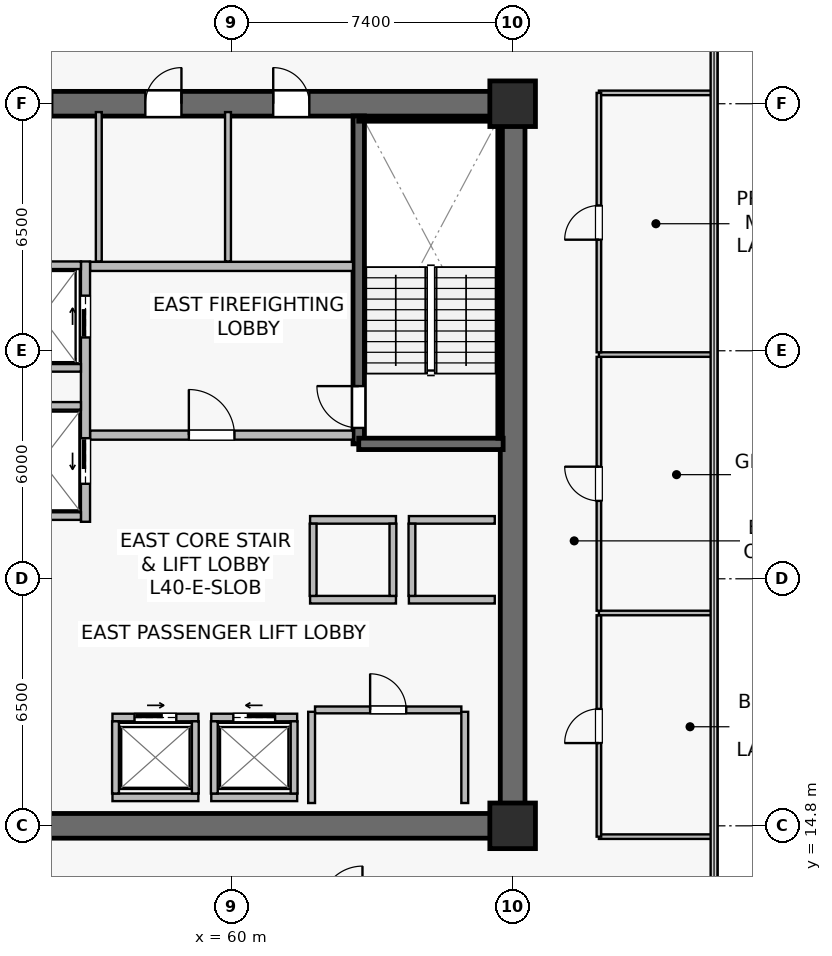
"""IFC4 building model, lengths in metres.
Left out: names, types, materials, properties, quantities, classifications, styles, units other than length and angle.
Written with IfcOpenShell. Run it as: python <this file> out.ifc"""

import sys

from ifc_helpers import new_model, si_unit, direction, frame, frame_2d, origin, origin_2d, place, context, subcontext, project, spatial, rectangle, extrude, source, transform, mapped, element, fill, save


model = new_model("IFC4")
c1 = context("Model", 3, precision=1e-05, world=origin(), true_north=direction((0.0, 1.0)))
c2 = subcontext(c1, "Body", "Model", "MODEL_VIEW")
j1 = project(units=[si_unit("LENGTHUNIT", "METRE"), si_unit("PLANEANGLEUNIT", "RADIAN")], contexts=[c1])
p1 = place(None, origin())
s1 = spatial("IfcSite", under=j1, at=p1, CompositionType="ELEMENT")
p2 = place(p1, origin())
s2 = spatial("IfcBuilding", under=s1, at=p2, CompositionType="ELEMENT")
p3 = place(p2, frame((0.0, 0.0, 166.6)))
s3 = spatial("IfcBuildingStorey", under=s2, at=p3, CompositionType="ELEMENT", Elevation=166.6)
p4 = place(p3, frame((52.275, 14.8, 0.0), z_axis=(0.0, 0.0, 1.0), x_axis=(1.0, 0.0, 0.0)))
e1 = element("IfcWall", 1, at=p4, inside=s3, PredefinedType="SHEAR", context=c2, shape_type="SweptSolid", body=[
    extrude(rectangle(XDim=15.45, YDim=0.65, at=frame_2d((7.725, 0.0))), origin(), (0.0, 0.0, 1.0), 3.79),
])
p5 = place(p3, frame((52.275, 33.8, 0.0), z_axis=(0.0, 0.0, 1.0), x_axis=(1.0, 0.0, 0.0)))
e2 = element("IfcWall", 2, at=p5, inside=s3, PredefinedType="SHEAR", context=c2, shape_type="SweptSolid", body=[
    extrude(rectangle(XDim=15.45, YDim=0.65, at=frame_2d((7.725, 0.0))), origin(), (0.0, 0.0, 1.0), 3.79),
])
p6 = place(p5, frame((8.825, 0.0, 0.0)))
e3 = element("IfcOpeningElement", 3, at=p6, cuts=e2, PredefinedType="OPENING", context=c2, shape_type="SweptSolid", body=[
    extrude(rectangle(XDim=0.95, YDim=2.15, at=frame_2d((0.475, 1.075))), frame((0.0, 0.335, 0.0), z_axis=(0.0, -1.0, 0.0), x_axis=(1.0, 0.0, 0.0)), (0.0, 0.0, 1.0), 0.67),
])
p7 = place(p5, frame((5.46, 0.0, 0.0)))
e4 = element("IfcOpeningElement", 4, at=p7, cuts=e2, PredefinedType="OPENING", context=c2, shape_type="SweptSolid", body=[
    extrude(rectangle(XDim=0.95, YDim=2.15, at=frame_2d((0.475, 1.075))), frame((0.0, 0.335, 0.0), z_axis=(0.0, -1.0, 0.0), x_axis=(1.0, 0.0, 0.0)), (0.0, 0.0, 1.0), 0.67),
])
p8 = place(p5, frame((2.06, 0.0, 0.0)))
e5 = element("IfcOpeningElement", 5, at=p8, cuts=e2, PredefinedType="OPENING", context=c2, shape_type="SweptSolid", body=[
    extrude(rectangle(XDim=0.95, YDim=2.15, at=frame_2d((0.475, 1.075))), frame((0.0, 0.335, 0.0), z_axis=(0.0, -1.0, 0.0), x_axis=(1.0, 0.0, 0.0)), (0.0, 0.0, 1.0), 0.67),
])
p9 = place(p3, frame((67.4, 15.125, 0.0), z_axis=(0.0, 0.0, 1.0), x_axis=(0.0, 1.0, 0.0)))
e6 = element("IfcWall", 6, at=p9, inside=s3, PredefinedType="SHEAR", context=c2, shape_type="SweptSolid", body=[
    extrude(rectangle(XDim=18.35, YDim=0.65, at=frame_2d((9.175, 0.0))), origin(), (0.0, 0.0, 1.0), 3.79),
])
p10 = place(p3, frame((63.35, 24.85, 0.0), z_axis=(0.0, 0.0, 1.0), x_axis=(0.0, 1.0, 0.0)))
e7 = element("IfcWall", 7, at=p10, inside=s3, PredefinedType="SHEAR", context=c2, shape_type="SweptSolid", body=[
    extrude(rectangle(XDim=8.63, YDim=0.3, at=frame_2d((4.315, 0.0))), origin(), (0.0, 0.0, 1.0), 3.79),
])
p11 = place(p10, frame((0.42, 0.0, 0.0)))
e8 = element("IfcOpeningElement", 8, at=p11, cuts=e7, PredefinedType="OPENING", context=c2, shape_type="SweptSolid", body=[
    extrude(rectangle(XDim=1.1, YDim=2.15, at=frame_2d((0.55, 1.075))), frame((0.0, 0.16, 0.0), z_axis=(0.0, -1.0, 0.0), x_axis=(1.0, 0.0, 0.0)), (0.0, 0.0, 1.0), 0.32),
])
p12 = place(p3, frame((63.35, 24.85, 0.0), z_axis=(0.0, 0.0, 1.0), x_axis=(1.0, 0.0, 0.0)))
e9 = element("IfcWall", 9, at=p12, inside=s3, PredefinedType="SHEAR", context=c2, shape_type="SweptSolid", body=[
    extrude(rectangle(XDim=3.8, YDim=0.3, at=frame_2d((1.9, 0.0))), origin(), (0.0, 0.0, 1.0), 3.79),
])
p13 = place(p3, frame((63.35, 33.4, 0.0), z_axis=(0.0, 0.0, 1.0), x_axis=(1.0, 0.0, 0.0)))
e10 = element("IfcWall", 10, at=p13, inside=s3, PredefinedType="SOLIDWALL", context=c2, shape_type="SweptSolid", body=[
    extrude(rectangle(XDim=3.72, YDim=0.12, at=frame_2d((1.86, 0.0))), origin(), (0.0, 0.0, 1.0), 3.79),
])
p14 = place(p3, frame((67.07, 25.0, 0.0), z_axis=(0.0, 0.0, 1.0), x_axis=(0.0, 1.0, 0.0)))
e11 = element("IfcWall", 11, at=p14, inside=s3, PredefinedType="SOLIDWALL", context=c2, shape_type="SweptSolid", body=[
    extrude(rectangle(XDim=8.32, YDim=0.12, at=frame_2d((4.16, 0.0))), origin(), (0.0, 0.0, 1.0), 3.79),
])
m1 = source(origin(), c2, "Body", "SweptSolid", [
    extrude(rectangle(XDim=1.2, YDim=1.2, at=origin_2d()), origin(), (0.0, 0.0, 1.0), 4.1),
])
for number, where, z_axis, x_axis in (
    (12, (67.4, 14.8, 0.0), (0.0, 0.0, 1.0), (1.0, 0.0, 0.0)),
    (13, (67.4, 33.8, 0.0), (0.0, 0.0, 1.0), (1.0, 0.0, 0.0)),
):
    element("IfcColumn", number, at=place(p3, frame(where, z_axis=z_axis, x_axis=x_axis)), inside=s3, PredefinedType="COLUMN", context=c2, shape_type="MappedRepresentation", body=[
        mapped(m1, transform((0.0, 0.0, 0.0), scale=1.0)),
    ])
p15 = place(p3, frame((56.28, 25.08, 0.0), z_axis=(0.0, 0.0, 1.0), x_axis=(1.0, 0.0, 0.0)))
e14 = element("IfcWall", 14, at=p15, inside=s3, PredefinedType="SOLIDWALL", context=c2, shape_type="SweptSolid", body=[
    extrude(rectangle(XDim=6.92, YDim=0.24, at=frame_2d((3.46, 0.0))), origin(), (0.0, 0.0, 1.0), 3.187),
])
p16 = place(p15, frame((2.6, 0.0, 0.0)))
e15 = element("IfcOpeningElement", 15, at=p16, cuts=e14, PredefinedType="OPENING", context=c2, shape_type="SweptSolid", body=[
    extrude(rectangle(XDim=1.2, YDim=2.16, at=frame_2d((0.6, 1.08))), frame((0.0, 0.13, 0.0), z_axis=(0.0, -1.0, 0.0), x_axis=(1.0, 0.0, 0.0)), (0.0, 0.0, 1.0), 0.26),
])
p17 = place(p3, frame((56.28, 29.52, 0.0), z_axis=(0.0, 0.0, 1.0), x_axis=(1.0, 0.0, 0.0)))
e16 = element("IfcWall", 16, at=p17, inside=s3, PredefinedType="SOLIDWALL", context=c2, shape_type="SweptSolid", body=[
    extrude(rectangle(XDim=6.92, YDim=0.24, at=frame_2d((3.46, 0.0))), origin(), (0.0, 0.0, 1.0), 3.187),
])
p18 = place(p3, frame((56.16, 22.8, 0.0), z_axis=(0.0, 0.0, 1.0), x_axis=(0.0, 1.0, 0.0)))
e17 = element("IfcWall", 17, at=p18, inside=s3, PredefinedType="SOLIDWALL", context=c2, shape_type="SweptSolid", body=[
    extrude(rectangle(XDim=6.85, YDim=0.24, at=frame_2d((3.425, 0.0))), origin(), (0.0, 0.0, 1.0), 2.925),
])
p19 = place(p18, frame((4.85, 0.0, 0.0)))
e18 = element("IfcOpeningElement", 18, at=p19, cuts=e17, PredefinedType="OPENING", context=c2, shape_type="SweptSolid", body=[
    extrude(rectangle(XDim=1.1, YDim=2.22, at=frame_2d((0.55, 1.11))), frame((0.0, 0.13, 0.0), z_axis=(0.0, -1.0, 0.0), x_axis=(1.0, 0.0, 0.0)), (0.0, 0.0, 1.0), 0.26),
])
p20 = place(p18, frame((1.0, 0.0, 0.0)))
e19 = element("IfcOpeningElement", 19, at=p20, cuts=e17, PredefinedType="OPENING", context=c2, shape_type="SweptSolid", body=[
    extrude(rectangle(XDim=1.2, YDim=2.22, at=frame_2d((0.6, 1.11))), frame((0.0, 0.13, 0.0), z_axis=(0.0, -1.0, 0.0), x_axis=(1.0, 0.0, 0.0)), (0.0, 0.0, 1.0), 0.26),
])
p21 = place(p3, frame((59.47, 17.65, 0.0), z_axis=(0.0, 0.0, 1.0), x_axis=(1.0, 0.0, 0.0)))
e20 = element("IfcWall", 20, at=p21, inside=s3, PredefinedType="SOLIDWALL", context=c2, shape_type="SweptSolid", body=[
    extrude(rectangle(XDim=2.26, YDim=0.2, at=frame_2d((1.13, 0.0))), origin(), (0.0, 0.0, 1.0), 3.187),
])
p22 = place(p21, frame((0.58, 0.0, 0.0)))
e21 = element("IfcOpeningElement", 21, at=p22, cuts=e20, PredefinedType="OPENING", context=c2, shape_type="SweptSolid", body=[
    extrude(rectangle(XDim=1.1, YDim=2.22, at=frame_2d((0.55, 1.11))), frame((0.0, 0.11, 0.0), z_axis=(0.0, -1.0, 0.0), x_axis=(1.0, 0.0, 0.0)), (0.0, 0.0, 1.0), 0.22),
])
p23 = place(p3, frame((59.47, 15.55, 0.0), z_axis=(0.0, 0.0, 1.0), x_axis=(1.0, 0.0, 0.0)))
e22 = element("IfcWall", 22, at=p23, inside=s3, PredefinedType="SOLIDWALL", context=c2, shape_type="SweptSolid", body=[
    extrude(rectangle(XDim=2.26, YDim=0.2, at=frame_2d((1.13, 0.0))), origin(), (0.0, 0.0, 1.0), 3.187),
])
for number, where, z_axis, x_axis in (
    (23, (59.55, 15.65, 0.0), (0.0, 0.0, 1.0), (0.0, 1.0, 0.0)),
    (24, (61.65, 15.65, 0.0), (0.0, 0.0, 1.0), (0.0, 1.0, 0.0)),
):
    element("IfcWall", number, at=place(p3, frame(where, z_axis=z_axis, x_axis=x_axis)), inside=s3, PredefinedType="SOLIDWALL", context=c2, shape_type="SweptSolid", body=[
        extrude(rectangle(XDim=1.9, YDim=0.18, at=frame_2d((0.95, 0.0))), origin(), (0.0, 0.0, 1.0), 3.79),
    ])
p24 = place(p3, frame((56.87, 17.65, 0.0), z_axis=(0.0, 0.0, 1.0), x_axis=(1.0, 0.0, 0.0)))
e25 = element("IfcWall", 25, at=p24, inside=s3, PredefinedType="SOLIDWALL", context=c2, shape_type="SweptSolid", body=[
    extrude(rectangle(XDim=2.26, YDim=0.2, at=frame_2d((1.13, 0.0))), origin(), (0.0, 0.0, 1.0), 3.79),
])
p25 = place(p24, frame((0.58, 0.0, 0.0)))
e26 = element("IfcOpeningElement", 26, at=p25, cuts=e25, PredefinedType="OPENING", context=c2, shape_type="SweptSolid", body=[
    extrude(rectangle(XDim=1.1, YDim=2.22, at=frame_2d((0.55, 1.11))), frame((0.0, 0.11, 0.0), z_axis=(0.0, -1.0, 0.0), x_axis=(1.0, 0.0, 0.0)), (0.0, 0.0, 1.0), 0.22),
])
p26 = place(p3, frame((56.87, 15.55, 0.0), z_axis=(0.0, 0.0, 1.0), x_axis=(1.0, 0.0, 0.0)))
e27 = element("IfcWall", 27, at=p26, inside=s3, PredefinedType="SOLIDWALL", context=c2, shape_type="SweptSolid", body=[
    extrude(rectangle(XDim=2.26, YDim=0.2, at=frame_2d((1.13, 0.0))), origin(), (0.0, 0.0, 1.0), 3.79),
])
for number, where, z_axis, x_axis in (
    (28, (56.95, 15.65, 0.0), (0.0, 0.0, 1.0), (0.0, 1.0, 0.0)),
    (29, (59.05, 15.65, 0.0), (0.0, 0.0, 1.0), (0.0, 1.0, 0.0)),
):
    element("IfcWall", number, at=place(p3, frame(where, z_axis=z_axis, x_axis=x_axis)), inside=s3, PredefinedType="SOLIDWALL", context=c2, shape_type="SweptSolid", body=[
        extrude(rectangle(XDim=1.9, YDim=0.18, at=frame_2d((0.95, 0.0))), origin(), (0.0, 0.0, 1.0), 3.79),
    ])
for number, where, z_axis, x_axis in (
    (30, (64.67, 20.75, 0.0), (0.0, 0.0, 1.0), (1.0, 0.0, 0.0)),
    (31, (64.67, 22.85, 0.0), (0.0, 0.0, 1.0), (1.0, 0.0, 0.0)),
):
    element("IfcWall", number, at=place(p3, frame(where, z_axis=z_axis, x_axis=x_axis)), inside=s3, PredefinedType="SOLIDWALL", context=c2, shape_type="SweptSolid", body=[
        extrude(rectangle(XDim=2.26, YDim=0.2, at=frame_2d((1.13, 0.0))), origin(), (0.0, 0.0, 1.0), 3.79),
    ])
p27 = place(p3, frame((64.75, 20.85, 0.0), z_axis=(0.0, 0.0, 1.0), x_axis=(0.0, 1.0, 0.0)))
e32 = element("IfcWall", 32, at=p27, inside=s3, PredefinedType="SOLIDWALL", context=c2, shape_type="SweptSolid", body=[
    extrude(rectangle(XDim=1.9, YDim=0.18, at=frame_2d((0.95, 0.0))), origin(), (0.0, 0.0, 1.0), 3.79),
])
for number, where, z_axis, x_axis in (
    (33, (62.07, 20.75, 0.0), (0.0, 0.0, 1.0), (1.0, 0.0, 0.0)),
    (34, (62.07, 22.85, 0.0), (0.0, 0.0, 1.0), (1.0, 0.0, 0.0)),
):
    element("IfcWall", number, at=place(p3, frame(where, z_axis=z_axis, x_axis=x_axis)), inside=s3, PredefinedType="SOLIDWALL", context=c2, shape_type="SweptSolid", body=[
        extrude(rectangle(XDim=2.26, YDim=0.2, at=frame_2d((1.13, 0.0))), origin(), (0.0, 0.0, 1.0), 3.79),
    ])
for number, where, z_axis, x_axis in (
    (35, (62.15, 20.85, 0.0), (0.0, 0.0, 1.0), (0.0, 1.0, 0.0)),
    (36, (64.25, 20.85, 0.0), (0.0, 0.0, 1.0), (0.0, 1.0, 0.0)),
):
    element("IfcWall", number, at=place(p3, frame(where, z_axis=z_axis, x_axis=x_axis)), inside=s3, PredefinedType="SOLIDWALL", context=c2, shape_type="SweptSolid", body=[
        extrude(rectangle(XDim=1.9, YDim=0.18, at=frame_2d((0.95, 0.0))), origin(), (0.0, 0.0, 1.0), 3.79),
    ])
p28 = place(p3, frame((53.85, 29.55, 0.0), z_axis=(0.0, 0.0, 1.0), x_axis=(1.0, 0.0, 0.0)))
e37 = element("IfcWall", 37, at=p28, inside=s3, PredefinedType="SOLIDWALL", context=c2, shape_type="SweptSolid", body=[
    extrude(rectangle(XDim=2.19, YDim=0.2, at=frame_2d((1.095, 0.0))), origin(), (0.0, 0.0, 1.0), 3.79),
])
p29 = place(p3, frame((53.85, 26.85, 0.0), z_axis=(0.0, 0.0, 1.0), x_axis=(1.0, 0.0, 0.0)))
e38 = element("IfcWall", 38, at=p29, inside=s3, PredefinedType="SOLIDWALL", context=c2, shape_type="SweptSolid", body=[
    extrude(rectangle(XDim=2.19, YDim=0.2, at=frame_2d((1.095, 0.0))), origin(), (0.0, 0.0, 1.0), 3.187),
])
for number, where, z_axis, x_axis in (
    (39, (53.85, 25.85, 0.0), (0.0, 0.0, 1.0), (1.0, 0.0, 0.0)),
    (40, (53.85, 22.95, 0.0), (0.0, 0.0, 1.0), (1.0, 0.0, 0.0)),
):
    element("IfcWall", number, at=place(p3, frame(where, z_axis=z_axis, x_axis=x_axis)), inside=s3, PredefinedType="SOLIDWALL", context=c2, shape_type="SweptSolid", body=[
        extrude(rectangle(XDim=2.19, YDim=0.2, at=frame_2d((1.095, 0.0))), origin(), (0.0, 0.0, 1.0), 3.79),
    ])
p30 = place(p3, frame((62.2, 17.85, 0.0), z_axis=(0.0, 0.0, 1.0), x_axis=(1.0, 0.0, 0.0)))
e41 = element("IfcWall", 41, at=p30, inside=s3, PredefinedType="SOLIDWALL", context=c2, shape_type="SweptSolid", body=[
    extrude(rectangle(XDim=3.85, YDim=0.18, at=frame_2d((1.925, 0.0))), origin(), (0.0, 0.0, 1.0), 3.79),
])
p31 = place(p30, frame((1.45, 0.0, 0.0)))
e42 = element("IfcOpeningElement", 42, at=p31, cuts=e41, PredefinedType="OPENING", context=c2, shape_type="SweptSolid", body=[
    extrude(rectangle(XDim=0.95, YDim=2.15, at=frame_2d((0.475, 1.075))), frame((0.0, 0.1, 0.0), z_axis=(0.0, -1.0, 0.0), x_axis=(1.0, 0.0, 0.0)), (0.0, 0.0, 1.0), 0.2),
])
for number, where, z_axis, x_axis in (
    (43, (62.11, 15.4, 0.0), (0.0, 0.0, 1.0), (0.0, 1.0, 0.0)),
    (44, (66.14, 15.4, 0.0), (0.0, 0.0, 1.0), (0.0, 1.0, 0.0)),
):
    element("IfcWall", number, at=place(p3, frame(where, z_axis=z_axis, x_axis=x_axis)), inside=s3, PredefinedType="SOLIDWALL", context=c2, shape_type="SweptSolid", body=[
        extrude(rectangle(XDim=2.4, YDim=0.18, at=frame_2d((1.2, 0.0))), origin(), (0.0, 0.0, 1.0), 3.79),
    ])
p32 = place(p3, frame((59.91, 29.65, 0.0), z_axis=(0.0, 0.0, 1.0), x_axis=(0.0, 1.0, 0.0)))
e45 = element("IfcWall", 45, at=p32, inside=s3, PredefinedType="PLUMBINGWALL", context=c2, shape_type="SweptSolid", body=[
    extrude(rectangle(XDim=3.93, YDim=0.155, at=frame_2d((1.965, 0.0))), origin(), (0.0, 0.0, 1.0), 3.187),
])
p33 = place(p3, frame((56.51, 29.65, 0.0), z_axis=(0.0, 0.0, 1.0), x_axis=(0.0, 1.0, 0.0)))
e46 = element("IfcWall", 46, at=p33, inside=s3, PredefinedType="PLUMBINGWALL", context=c2, shape_type="SweptSolid", body=[
    extrude(rectangle(XDim=3.93, YDim=0.155, at=frame_2d((1.965, 0.0))), origin(), (0.0, 0.0, 1.0), 3.79),
])
for number, where, z_axis, x_axis in (
    (47, (69.67, 14.515, 0.0), (0.0, 0.0, 1.0), (1.0, 0.0, 0.0)),
    (48, (69.67, 34.085, 0.0), (0.0, 0.0, 1.0), (1.0, 0.0, 0.0)),
):
    element("IfcWall", number, at=place(p3, frame(where, z_axis=z_axis, x_axis=x_axis)), inside=s3, PredefinedType="PARTITIONING", context=c2, shape_type="SweptSolid", body=[
        extrude(rectangle(XDim=3.02, YDim=0.12, at=frame_2d((1.51, 0.0))), origin(), (0.0, 0.0, 1.0), 3.79),
    ])
p34 = place(p3, frame((69.67, 14.515, 0.0), z_axis=(0.0, 0.0, 1.0), x_axis=(0.0, 1.0, 0.0)))
e49 = element("IfcWall", 49, at=p34, inside=s3, PredefinedType="PARTITIONING", context=c2, shape_type="SweptSolid", body=[
    extrude(rectangle(XDim=5.825, YDim=0.12, at=frame_2d((2.913, 0.0))), origin(), (0.0, 0.0, 1.0), 3.79),
])
p35 = place(p34, frame((2.462, 0.0, 0.0)))
e50 = element("IfcOpeningElement", 50, at=p35, cuts=e49, PredefinedType="OPENING", context=c2, shape_type="SweptSolid", body=[
    extrude(rectangle(XDim=0.9, YDim=2.1, at=frame_2d((0.45, 1.05))), frame((0.0, 0.07, 0.0), z_axis=(0.0, -1.0, 0.0), x_axis=(1.0, 0.0, 0.0)), (0.0, 0.0, 1.0), 0.14),
])
p36 = place(p3, frame((69.67, 20.4, 0.0), z_axis=(0.0, 0.0, 1.0), x_axis=(1.0, 0.0, 0.0)))
e51 = element("IfcWall", 51, at=p36, inside=s3, PredefinedType="PARTITIONING", context=c2, shape_type="SweptSolid", body=[
    extrude(rectangle(XDim=3.02, YDim=0.12, at=frame_2d((1.51, 0.0))), origin(), (0.0, 0.0, 1.0), 3.79),
])
p37 = place(p3, frame((69.67, 20.46, 0.0), z_axis=(0.0, 0.0, 1.0), x_axis=(0.0, 1.0, 0.0)))
e52 = element("IfcWall", 52, at=p37, inside=s3, PredefinedType="PARTITIONING", context=c2, shape_type="SweptSolid", body=[
    extrude(rectangle(XDim=6.68, YDim=0.12, at=frame_2d((3.34, 0.0))), origin(), (0.0, 0.0, 1.0), 3.79),
])
p38 = place(p37, frame((2.89, 0.0, 0.0)))
e53 = element("IfcOpeningElement", 53, at=p38, cuts=e52, PredefinedType="OPENING", context=c2, shape_type="SweptSolid", body=[
    extrude(rectangle(XDim=0.9, YDim=2.1, at=frame_2d((0.45, 1.05))), frame((0.0, 0.07, 0.0), z_axis=(0.0, -1.0, 0.0), x_axis=(1.0, 0.0, 0.0)), (0.0, 0.0, 1.0), 0.14),
])
p39 = place(p3, frame((69.67, 27.2, 0.0), z_axis=(0.0, 0.0, 1.0), x_axis=(1.0, 0.0, 0.0)))
e54 = element("IfcWall", 54, at=p39, inside=s3, PredefinedType="PARTITIONING", context=c2, shape_type="SweptSolid", body=[
    extrude(rectangle(XDim=3.02, YDim=0.12, at=frame_2d((1.51, 0.0))), origin(), (0.0, 0.0, 1.0), 3.79),
])
p40 = place(p3, frame((69.67, 27.26, 0.0), z_axis=(0.0, 0.0, 1.0), x_axis=(0.0, 1.0, 0.0)))
e55 = element("IfcWall", 55, at=p40, inside=s3, PredefinedType="PARTITIONING", context=c2, shape_type="SweptSolid", body=[
    extrude(rectangle(XDim=6.825, YDim=0.12, at=frame_2d((3.413, 0.0))), origin(), (0.0, 0.0, 1.0), 3.79),
])
p41 = place(p40, frame((2.962, 0.0, 0.0)))
e56 = element("IfcOpeningElement", 56, at=p41, cuts=e55, PredefinedType="OPENING", context=c2, shape_type="SweptSolid", body=[
    extrude(rectangle(XDim=0.9, YDim=2.1, at=frame_2d((0.45, 1.05))), frame((0.0, 0.07, 0.0), z_axis=(0.0, -1.0, 0.0), x_axis=(1.0, 0.0, 0.0)), (0.0, 0.0, 1.0), 0.14),
])
m2 = source(origin(), c2, "Body", "SweptSolid", [
    extrude(rectangle(XDim=1.1, YDim=2.15, at=frame_2d((0.55, 1.075))), frame((0.0, 0.025, 0.0), z_axis=(0.0, -1.0, 0.0), x_axis=(1.0, 0.0, 0.0)), (0.0, 0.0, 1.0), 0.05),
])
p42 = place(p11, origin())
e57 = element("IfcDoor", 57, at=p42, inside=s3, OperationType="SINGLE_SWING_RIGHT", PredefinedType="DOOR", context=c2, shape_type="MappedRepresentation", body=[
    mapped(m2, transform((0.0, 0.0, 0.0), scale=1.0)),
])
fill(e8, e57)
m3 = source(origin(), c2, "Body", "SweptSolid", [
    extrude(rectangle(XDim=1.2, YDim=2.16, at=frame_2d((0.6, 1.08))), frame((0.0, 0.025, 0.0), z_axis=(0.0, -1.0, 0.0), x_axis=(1.0, 0.0, 0.0)), (0.0, 0.0, 1.0), 0.05),
])
p43 = place(p16, origin())
e58 = element("IfcDoor", 58, at=p43, inside=s3, OperationType="SINGLE_SWING_LEFT", PredefinedType="DOOR", context=c2, shape_type="MappedRepresentation", body=[
    mapped(m3, transform((0.0, 0.0, 0.0), scale=1.0)),
])
fill(e15, e58)
m4 = source(origin(), c2, "Body", "SweptSolid", [
    extrude(rectangle(XDim=1.1, YDim=2.22, at=frame_2d((0.55, 1.11))), frame((0.0, 0.025, 0.0), z_axis=(0.0, -1.0, 0.0), x_axis=(1.0, 0.0, 0.0)), (0.0, 0.0, 1.0), 0.05),
])
p44 = place(p22, origin())
e59 = element("IfcDoor", 59, at=p44, inside=s3, OperationType="SLIDING_TO_LEFT", PredefinedType="USERDEFINED", context=c2, shape_type="MappedRepresentation", body=[
    mapped(m4, transform((0.0, 0.0, 0.0), scale=1.0)),
])
fill(e21, e59)
p45 = place(p25, origin())
e60 = element("IfcDoor", 60, at=p45, inside=s3, OperationType="SLIDING_TO_RIGHT", PredefinedType="USERDEFINED", context=c2, shape_type="MappedRepresentation", body=[
    mapped(m4, transform((0.0, 0.0, 0.0), scale=1.0)),
])
fill(e26, e60)
p46 = place(p19, origin())
e61 = element("IfcDoor", 61, at=p46, inside=s3, OperationType="SLIDING_TO_RIGHT", PredefinedType="USERDEFINED", context=c2, shape_type="MappedRepresentation", body=[
    mapped(m4, transform((0.0, 0.0, 0.0), scale=1.0)),
])
fill(e18, e61)
m5 = source(origin(), c2, "Body", "SweptSolid", [
    extrude(rectangle(XDim=1.2, YDim=2.22, at=frame_2d((0.6, 1.11))), frame((0.0, 0.025, 0.0), z_axis=(0.0, -1.0, 0.0), x_axis=(1.0, 0.0, 0.0)), (0.0, 0.0, 1.0), 0.05),
])
p47 = place(p20, origin())
e62 = element("IfcDoor", 62, at=p47, inside=s3, OperationType="SLIDING_TO_LEFT", PredefinedType="USERDEFINED", context=c2, shape_type="MappedRepresentation", body=[
    mapped(m5, transform((0.0, 0.0, 0.0), scale=1.0)),
])
fill(e19, e62)
m6 = source(origin(), c2, "Body", "SweptSolid", [
    extrude(rectangle(XDim=0.95, YDim=2.15, at=frame_2d((0.475, 1.075))), frame((0.0, 0.025, 0.0), z_axis=(0.0, -1.0, 0.0), x_axis=(1.0, 0.0, 0.0)), (0.0, 0.0, 1.0), 0.05),
])
p48 = place(p31, origin())
e63 = element("IfcDoor", 63, at=p48, inside=s3, OperationType="SINGLE_SWING_LEFT", PredefinedType="DOOR", context=c2, shape_type="MappedRepresentation", body=[
    mapped(m6, transform((0.0, 0.0, 0.0), scale=1.0)),
])
fill(e42, e63)
p49 = place(p6, origin())
e64 = element("IfcDoor", 64, at=p49, inside=s3, OperationType="SINGLE_SWING_LEFT", PredefinedType="DOOR", context=c2, shape_type="MappedRepresentation", body=[
    mapped(m6, transform((0.0, 0.0, 0.0), scale=1.0)),
])
fill(e3, e64)
p50 = place(p7, origin())
e65 = element("IfcDoor", 65, at=p50, inside=s3, OperationType="SINGLE_SWING_RIGHT", PredefinedType="DOOR", context=c2, shape_type="MappedRepresentation", body=[
    mapped(m6, transform((0.0, 0.0, 0.0), scale=1.0)),
])
fill(e4, e65)
p51 = place(p8, origin())
e66 = element("IfcDoor", 66, at=p51, inside=s3, OperationType="SINGLE_SWING_LEFT", PredefinedType="DOOR", context=c2, shape_type="MappedRepresentation", body=[
    mapped(m6, transform((0.0, 0.0, 0.0), scale=1.0)),
])
fill(e5, e66)
m7 = source(origin(), c2, "Body", "SweptSolid", [
    extrude(rectangle(XDim=0.9, YDim=2.1, at=frame_2d((0.45, 1.05))), frame((0.0, 0.025, 0.0), z_axis=(0.0, -1.0, 0.0), x_axis=(1.0, 0.0, 0.0)), (0.0, 0.0, 1.0), 0.05),
])
p52 = place(p35, origin())
e67 = element("IfcDoor", 67, at=p52, inside=s3, OperationType="SINGLE_SWING_LEFT", PredefinedType="DOOR", context=c2, shape_type="MappedRepresentation", body=[
    mapped(m7, transform((0.0, 0.0, 0.0), scale=1.0)),
])
fill(e50, e67)
p53 = place(p38, origin())
e68 = element("IfcDoor", 68, at=p53, inside=s3, OperationType="SINGLE_SWING_RIGHT", PredefinedType="DOOR", context=c2, shape_type="MappedRepresentation", body=[
    mapped(m7, transform((0.0, 0.0, 0.0), scale=1.0)),
])
fill(e53, e68)
p54 = place(p41, origin())
e69 = element("IfcDoor", 69, at=p54, inside=s3, OperationType="SINGLE_SWING_LEFT", PredefinedType="DOOR", context=c2, shape_type="MappedRepresentation", body=[
    mapped(m7, transform((0.0, 0.0, 0.0), scale=1.0)),
])
fill(e56, e69)
save(model, sys.argv[1])
